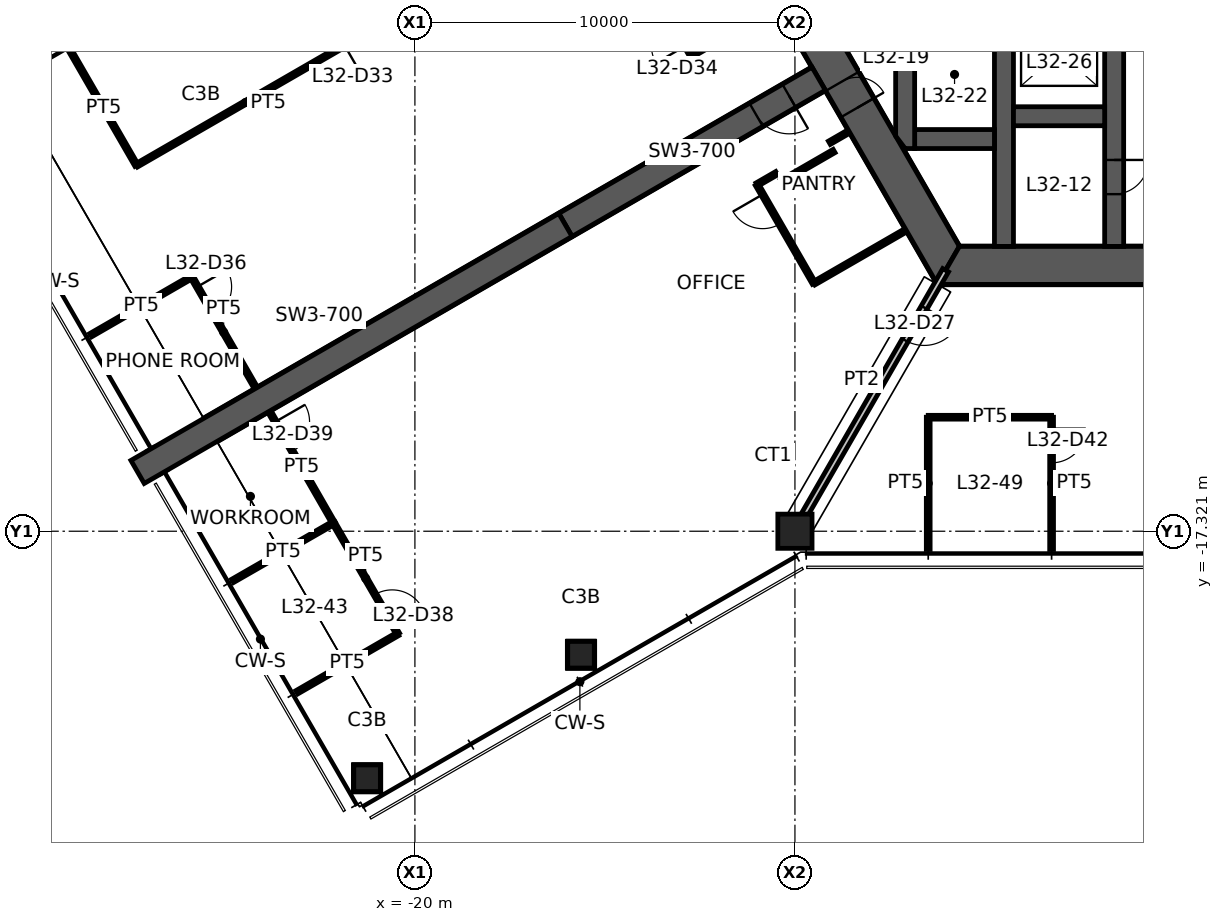
"""IFC4 building model, lengths in metres.
Left out: names, types, materials, properties, quantities, classifications, styles, units other than length and angle.
Written with IfcOpenShell. Run it as: python <this file> out.ifc"""

import sys

from ifc_helpers import new_model, si_unit, direction, frame, frame_2d, origin, origin_2d, place, context, subcontext, project, spatial, polyline, rectangle, hollow_rectangle, outline, extrude, element, fill, save


model = new_model("IFC4")
c1 = context("Model", 3, precision=1e-05, world=origin(), true_north=direction((0.0, 1.0)))
c2 = subcontext(c1, "Body", "Model", "MODEL_VIEW")
j1 = project(units=[si_unit("LENGTHUNIT", "METRE"), si_unit("PLANEANGLEUNIT", "RADIAN")], contexts=[c1])
p1 = place(None, origin())
s1 = spatial("IfcSite", under=j1, at=p1, CompositionType="ELEMENT")
p2 = place(p1, origin())
s2 = spatial("IfcBuilding", under=s1, at=p2, CompositionType="ELEMENT")
p3 = place(p2, frame((0.0, 0.0, 128.6)))
s3 = spatial("IfcBuildingStorey", under=s2, at=p3, CompositionType="ELEMENT", Elevation=128.6)
p4 = place(p3, frame((-10.0, -17.321, 0.0), z_axis=(0.0, 0.0, 1.0), x_axis=(1.0, 0.0, 0.0)))
e1 = element("IfcColumn", 1, at=p4, inside=s3, PredefinedType="COLUMN", context=c2, shape_type="SweptSolid", body=[
    extrude(hollow_rectangle(XDim=0.9, YDim=0.9, WallThickness=0.07, at=origin_2d()), origin(), (0.0, 0.0, 1.0), 4.5),
])
for number, where, z_axis, x_axis in (
    (2, (-15.629, -20.571, 0.0), (0.0, 0.0, 1.0), (1.0, 0.0, 0.0)),
    (3, (-21.258, -23.821, 0.0), (0.0, 0.0, 1.0), (1.0, 0.0, 0.0)),
):
    element("IfcColumn", number, at=place(p3, frame(where, z_axis=z_axis, x_axis=x_axis)), inside=s3, PredefinedType="COLUMN", context=c2, shape_type="SweptSolid", body=[
        extrude(hollow_rectangle(XDim=0.7, YDim=0.7, WallThickness=0.036, at=origin_2d()), origin(), (0.0, 0.0, 1.0), 4.5),
    ])
p5 = place(p3, frame((-11.922, 0.0, 0.0), z_axis=(0.0, 0.0, 1.0), x_axis=(0.500004296715, -0.866022923061, 0.0)))
e4 = element("IfcWall", 4, at=p5, inside=s3, PredefinedType="SHEAR", context=c2, shape_type="SweptSolid", body=[
    extrude(outline(polyline([(-0.289, -0.5), (6.331, -0.5), (7.131, -0.5), (12.211, -0.5), (11.634, 0.5), (7.131, 0.5), (6.331, 0.5), (0.289, 0.5), (-0.289, -0.5)])), origin(), (0.0, 0.0, 1.0), 4.5),
])
p6 = place(p5, frame((6.331, 0.0, 0.0)))
e5 = element("IfcOpeningElement", 5, at=p6, cuts=e4, PredefinedType="OPENING", context=c2, shape_type="SweptSolid", body=[
    extrude(rectangle(XDim=0.8, YDim=2.1, at=frame_2d((0.4, 1.05))), frame((0.0, 0.51, 0.0), z_axis=(0.0, -1.0, 0.0), x_axis=(1.0, 0.0, 0.0)), (0.0, 0.0, 1.0), 1.02),
])
p7 = place(p3, frame((-5.961, -10.325, 0.0), z_axis=(0.0, 0.0, 1.0), x_axis=(1.0, 0.0, 0.0)))
e6 = element("IfcWall", 6, at=p7, inside=s3, PredefinedType="SHEAR", context=c2, shape_type="SweptSolid", body=[
    extrude(outline(polyline([(-0.289, -0.5), (5.461, -0.5), (6.461, -0.5), (12.211, -0.5), (11.634, 0.5), (6.461, 0.5), (5.461, 0.5), (0.289, 0.5), (-0.289, -0.5)])), origin(), (0.0, 0.0, 1.0), 4.5),
])
p8 = place(p7, frame((5.461, 0.0, 0.0)))
e7 = element("IfcOpeningElement", 7, at=p8, cuts=e6, PredefinedType="OPENING", context=c2, shape_type="SweptSolid", body=[
    extrude(rectangle(XDim=1.0, YDim=2.1, at=frame_2d((0.5, 1.05))), frame((0.0, 0.51, 0.0), z_axis=(0.0, -1.0, 0.0), x_axis=(1.0, 0.0, 0.0)), (0.0, 0.0, 1.0), 1.02),
])
p9 = place(p3, frame((-9.375, -5.413, 0.0), z_axis=(0.0, 0.0, 1.0), x_axis=(-0.866032377459, -0.499987921047, 0.0)))
e8 = element("IfcWall", 8, at=p9, inside=s3, PredefinedType="SHEAR", context=c2, shape_type="SweptSolid", body=[
    extrude(rectangle(XDim=7.696, YDim=0.7, at=frame_2d((3.848, 0.0))), origin(), (0.0, 0.0, 1.0), 4.5),
])
p10 = place(p9, frame((0.9, 0.0, 0.0)))
e9 = element("IfcOpeningElement", 9, at=p10, cuts=e8, PredefinedType="OPENING", context=c2, shape_type="SweptSolid", body=[
    extrude(rectangle(XDim=1.0, YDim=2.1, at=frame_2d((0.5, 1.05))), frame((0.0, 0.36, 0.0), z_axis=(0.0, -1.0, 0.0), x_axis=(1.0, 0.0, 0.0)), (0.0, 0.0, 1.0), 0.72),
])
p11 = place(p3, frame((-16.039, -9.26, 0.0), z_axis=(0.0, 0.0, 1.0), x_axis=(-0.866024837091, -0.50000098154, 0.0)))
e10 = element("IfcWall", 10, at=p11, inside=s3, PredefinedType="SHEAR", context=c2, shape_type="SweptSolid", body=[
    extrude(rectangle(XDim=13.0, YDim=0.7, at=frame_2d((6.5, 0.0))), origin(), (0.0, 0.0, 1.0), 4.5),
])
p12 = place(p3, frame((-1.6, -3.85, 0.0), z_axis=(0.0, 0.0, 1.0), x_axis=(0.0, -1.0, 0.0)))
e11 = element("IfcWall", 11, at=p12, inside=s3, PredefinedType="SHEAR", context=c2, shape_type="SweptSolid", body=[
    extrude(rectangle(XDim=5.975, YDim=0.5, at=frame_2d((2.987, 0.0))), origin(), (0.0, 0.0, 1.0), 4.5),
])
p13 = place(p12, frame((3.7, 0.0, 0.0)))
e12 = element("IfcOpeningElement", 12, at=p13, cuts=e11, PredefinedType="OPENING", context=c2, shape_type="SweptSolid", body=[
    extrude(rectangle(XDim=0.9, YDim=2.1, at=frame_2d((0.45, 1.05))), frame((0.0, 0.26, 0.0), z_axis=(0.0, -1.0, 0.0), x_axis=(1.0, 0.0, 0.0)), (0.0, 0.0, 1.0), 0.52),
])
p14 = place(p3, frame((-4.5, -3.85, 0.0), z_axis=(0.0, 0.0, 1.0), x_axis=(0.0, -1.0, 0.0)))
e13 = element("IfcWall", 13, at=p14, inside=s3, PredefinedType="SHEAR", context=c2, shape_type="SweptSolid", body=[
    extrude(rectangle(XDim=5.975, YDim=0.5, at=frame_2d((2.987, 0.0))), origin(), (0.0, 0.0, 1.0), 4.5),
])
p15 = place(p3, frame((-4.25, -6.4, 0.0), z_axis=(0.0, 0.0, 1.0), x_axis=(1.0, 0.0, 0.0)))
e14 = element("IfcWall", 14, at=p15, inside=s3, PredefinedType="SHEAR", context=c2, shape_type="SweptSolid", body=[
    extrude(rectangle(XDim=2.4, YDim=0.5, at=frame_2d((1.2, 0.0))), origin(), (0.0, 0.0, 1.0), 4.5),
])
p16 = place(p3, frame((-6.85, -7.0, 0.0), z_axis=(0.0, 0.0, 1.0), x_axis=(1.0, 0.0, 0.0)))
e15 = element("IfcWall", 15, at=p16, inside=s3, PredefinedType="SHEAR", context=c2, shape_type="SweptSolid", body=[
    extrude(rectangle(XDim=2.1, YDim=0.5, at=frame_2d((1.05, 0.0))), origin(), (0.0, 0.0, 1.0), 4.5),
])
p17 = place(p3, frame((-7.1, -3.85, 0.0), z_axis=(0.0, 0.0, 1.0), x_axis=(0.0, -1.0, 0.0)))
e16 = element("IfcWall", 16, at=p17, inside=s3, PredefinedType="SHEAR", context=c2, shape_type="SweptSolid", body=[
    extrude(outline(polyline([(0.0, -0.25), (3.069, -0.25), (3.4, 0.0), (3.4, 0.25), (0.0, 0.25), (0.0, -0.25)])), origin(), (0.0, 0.0, 1.0), 4.5),
])
p18 = place(p3, frame((-6.035, -10.453, 0.0), z_axis=(0.0, 0.0, 1.0), x_axis=(-0.499989830942, -0.866031274813, 0.0)))
e17 = element("IfcWall", 17, at=p18, inside=s3, PredefinedType="PARTITIONING", context=c2, shape_type="SweptSolid", body=[
    extrude(rectangle(XDim=7.93, YDim=0.175, at=frame_2d((3.965, 0.0))), origin(), (0.0, 0.0, 1.0), 3.65),
])
p19 = place(p18, frame((1.13, 0.0, 0.0)))
e18 = element("IfcOpeningElement", 18, at=p19, cuts=e17, PredefinedType="OPENING", context=c2, shape_type="SweptSolid", body=[
    extrude(rectangle(XDim=1.0, YDim=2.1, at=frame_2d((0.5, 1.05))), frame((0.0, 0.098, 0.0), z_axis=(0.0, -1.0, 0.0), x_axis=(1.0, 0.0, 0.0)), (0.0, 0.0, 1.0), 0.195),
])
p20 = place(p3, frame((-27.325, -7.693, 0.0), z_axis=(0.0, 0.0, 1.0), x_axis=(-0.500020871164, 0.866013353477, 0.0)))
e19 = element("IfcWall", 19, at=p20, inside=s3, PredefinedType="PARTITIONING", context=c2, shape_type="SweptSolid", body=[
    extrude(rectangle(XDim=3.47, YDim=0.1, at=frame_2d((1.735, 0.0))), origin(), (0.0, 0.0, 1.0), 3.55),
])
p21 = place(p3, frame((-21.592, -4.383, 0.0), z_axis=(0.0, 0.0, 1.0), x_axis=(-0.866021597574, -0.500006592492, 0.0)))
e20 = element("IfcWall", 20, at=p21, inside=s3, PredefinedType="PARTITIONING", context=c2, shape_type="SweptSolid", body=[
    extrude(rectangle(XDim=6.62, YDim=0.1, at=frame_2d((3.31, 0.0))), origin(), (0.0, 0.0, 1.0), 3.55),
])
p22 = place(p21, frame((0.3, 0.0, 0.0)))
e21 = element("IfcOpeningElement", 21, at=p22, cuts=e20, PredefinedType="OPENING", context=c2, shape_type="SweptSolid", body=[
    extrude(rectangle(XDim=0.9, YDim=2.1, at=frame_2d((0.45, 1.05))), frame((0.0, 0.06, 0.0), z_axis=(0.0, -1.0, 0.0), x_axis=(1.0, 0.0, 0.0)), (0.0, 0.0, 1.0), 0.12),
])
p23 = place(p3, frame((-12.726, -4.807, 0.0), z_axis=(0.0, 0.0, 1.0), x_axis=(-0.500062241894, 0.865989465428, 0.0)))
e22 = element("IfcWall", 22, at=p23, inside=s3, PredefinedType="PARTITIONING", context=c2, shape_type="SweptSolid", body=[
    extrude(rectangle(XDim=3.4, YDim=0.1, at=frame_2d((1.7, 0.0))), origin(), (0.0, 0.0, 1.0), 3.55),
])
p24 = place(p23, frame((0.3, 0.0, 0.0)))
e23 = element("IfcOpeningElement", 23, at=p24, cuts=e22, PredefinedType="OPENING", context=c2, shape_type="SweptSolid", body=[
    extrude(rectangle(XDim=0.9, YDim=2.1, at=frame_2d((0.45, 1.05))), frame((0.0, 0.06, 0.0), z_axis=(0.0, -1.0, 0.0), x_axis=(1.0, 0.0, 0.0)), (0.0, 0.0, 1.0), 0.12),
])
p25 = place(p3, frame((-10.492, -3.517, 0.0), z_axis=(0.0, 0.0, 1.0), x_axis=(-0.866021702275, -0.500006411147, 0.0)))
e24 = element("IfcWall", 24, at=p25, inside=s3, PredefinedType="PARTITIONING", context=c2, shape_type="SweptSolid", body=[
    extrude(rectangle(XDim=2.58, YDim=0.1, at=frame_2d((1.29, 0.0))), origin(), (0.0, 0.0, 1.0), 3.55),
])
p26 = place(p3, frame((-28.532, -12.162, 0.0), z_axis=(0.0, 0.0, 1.0), x_axis=(0.866037264291, 0.499979456437, 0.0)))
e25 = element("IfcWall", 25, at=p26, inside=s3, PredefinedType="PARTITIONING", context=c2, shape_type="SweptSolid", body=[
    extrude(rectangle(XDim=3.07, YDim=0.1, at=frame_2d((1.535, 0.0))), origin(), (0.0, 0.0, 1.0), 3.55),
])
p27 = place(p3, frame((-25.873, -10.627, 0.0), z_axis=(0.0, 0.0, 1.0), x_axis=(0.5000115033, -0.866018762249, 0.0)))
e26 = element("IfcWall", 26, at=p27, inside=s3, PredefinedType="PARTITIONING", context=c2, shape_type="SweptSolid", body=[
    extrude(rectangle(XDim=3.363, YDim=0.1, at=frame_2d((1.682, 0.0))), origin(), (0.0, 0.0, 1.0), 3.55),
])
p28 = place(p27, frame((0.3, 0.0, 0.0)))
e27 = element("IfcOpeningElement", 27, at=p28, cuts=e26, PredefinedType="OPENING", context=c2, shape_type="SweptSolid", body=[
    extrude(rectangle(XDim=0.9, YDim=2.1, at=frame_2d((0.45, 1.05))), frame((0.0, 0.06, 0.0), z_axis=(0.0, -1.0, 0.0), x_axis=(1.0, 0.0, 0.0)), (0.0, 0.0, 1.0), 0.12),
])
p29 = place(p3, frame((-11.0, -8.198, 0.0), z_axis=(0.0, 0.0, 1.0), x_axis=(0.866131372301, 0.499816412211, 0.0)))
e28 = element("IfcWall", 28, at=p29, inside=s3, PredefinedType="PARTITIONING", context=c2, shape_type="SweptSolid", body=[
    extrude(rectangle(XDim=0.6, YDim=0.1, at=frame_2d((0.3, 0.0))), origin(), (0.0, 0.0, 1.0), 3.55),
])
p30 = place(p3, frame((-10.355, -8.115, 0.0), z_axis=(0.0, 0.0, 1.0), x_axis=(0.866094119867, 0.499880961361, 0.0)))
e29 = element("IfcWall", 29, at=p30, inside=s3, PredefinedType="PARTITIONING", context=c2, shape_type="SweptSolid", body=[
    extrude(rectangle(XDim=1.6, YDim=0.1, at=frame_2d((0.8, 0.0))), origin(), (0.0, 0.0, 1.0), 3.55),
])
p31 = place(p3, frame((-9.5, -10.796, 0.0), z_axis=(0.0, 0.0, 1.0), x_axis=(-0.499990139034, 0.866031096941, 0.0)))
e30 = element("IfcWall", 30, at=p31, inside=s3, PredefinedType="PARTITIONING", context=c2, shape_type="SweptSolid", body=[
    extrude(rectangle(XDim=3.0, YDim=0.1, at=frame_2d((1.5, 0.0))), origin(), (0.0, 0.0, 1.0), 3.55),
])
p32 = place(p31, frame((1.8, 0.0, 0.0)))
e31 = element("IfcOpeningElement", 31, at=p32, cuts=e30, PredefinedType="OPENING", context=c2, shape_type="SweptSolid", body=[
    extrude(rectangle(XDim=0.9, YDim=2.1, at=frame_2d((0.45, 1.05))), frame((0.0, 0.06, 0.0), z_axis=(0.0, -1.0, 0.0), x_axis=(1.0, 0.0, 0.0)), (0.0, 0.0, 1.0), 0.12),
])
p33 = place(p3, frame((-9.094, -7.098, 0.0), z_axis=(0.0, 0.0, 1.0), x_axis=(0.865954211699, 0.50012328804, 0.0)))
e32 = element("IfcWall", 32, at=p33, inside=s3, PredefinedType="PARTITIONING", context=c2, shape_type="SweptSolid", body=[
    extrude(rectangle(XDim=0.58, YDim=0.1, at=frame_2d((0.29, 0.0))), origin(), (0.0, 0.0, 1.0), 3.55),
])
p34 = place(p3, frame((-7.092, -9.406, 0.0), z_axis=(0.0, 0.0, 1.0), x_axis=(-0.86603494908, -0.499983466698, 0.0)))
e33 = element("IfcWall", 33, at=p34, inside=s3, PredefinedType="PARTITIONING", context=c2, shape_type="SweptSolid", body=[
    extrude(rectangle(XDim=2.78, YDim=0.1, at=frame_2d((1.39, 0.0))), origin(), (0.0, 0.0, 1.0), 3.55),
])
p35 = place(p3, frame((-24.799, -18.628, 0.0), z_axis=(0.0, 0.0, 1.0), x_axis=(0.866820377992, 0.498620529359, 0.0)))
e34 = element("IfcWall", 34, at=p35, inside=s3, PredefinedType="PARTITIONING", context=c2, shape_type="SweptSolid", body=[
    extrude(rectangle(XDim=3.07, YDim=0.1, at=frame_2d((1.535, 0.0))), origin(), (0.0, 0.0, 1.0), 3.55),
])
p36 = place(p3, frame((-22.144, -17.096, 0.0), z_axis=(0.0, 0.0, 1.0), x_axis=(0.501158580036, -0.865355463181, 0.0)))
e35 = element("IfcWall", 35, at=p36, inside=s3, PredefinedType="PARTITIONING", context=c2, shape_type="SweptSolid", body=[
    extrude(rectangle(XDim=3.383, YDim=0.1, at=frame_2d((1.692, 0.0))), origin(), (0.0, 0.0, 1.0), 3.55),
])
p37 = place(p36, frame((2.183, 0.0, 0.0)))
e36 = element("IfcOpeningElement", 36, at=p37, cuts=e35, PredefinedType="OPENING", context=c2, shape_type="SweptSolid", body=[
    extrude(rectangle(XDim=0.9, YDim=2.1, at=frame_2d((0.45, 1.05))), frame((0.0, 0.06, 0.0), z_axis=(0.0, -1.0, 0.0), x_axis=(1.0, 0.0, 0.0)), (0.0, 0.0, 1.0), 0.12),
])
p38 = place(p3, frame((-20.448, -20.023, 0.0), z_axis=(0.0, 0.0, 1.0), x_axis=(-0.866002828817, -0.500039098953, 0.0)))
e37 = element("IfcWall", 37, at=p38, inside=s3, PredefinedType="PARTITIONING", context=c2, shape_type="SweptSolid", body=[
    extrude(rectangle(XDim=3.07, YDim=0.1, at=frame_2d((1.535, 0.0))), origin(), (0.0, 0.0, 1.0), 3.55),
])
p39 = place(p3, frame((-23.822, -14.181, 0.0), z_axis=(0.0, 0.0, 1.0), x_axis=(0.498880193261, -0.866670959922, 0.0)))
e38 = element("IfcWall", 38, at=p39, inside=s3, PredefinedType="PARTITIONING", context=c2, shape_type="SweptSolid", body=[
    extrude(rectangle(XDim=3.364, YDim=0.1, at=frame_2d((1.682, 0.0))), origin(), (0.0, 0.0, 1.0), 3.55),
])
p40 = place(p39, frame((0.3, 0.0, 0.0)))
e39 = element("IfcOpeningElement", 39, at=p40, cuts=e38, PredefinedType="OPENING", context=c2, shape_type="SweptSolid", body=[
    extrude(rectangle(XDim=0.9, YDim=2.1, at=frame_2d((0.45, 1.05))), frame((0.0, 0.06, 0.0), z_axis=(0.0, -1.0, 0.0), x_axis=(1.0, 0.0, 0.0)), (0.0, 0.0, 1.0), 0.12),
])
p41 = place(p3, frame((-6.493, -17.801, 0.0), z_axis=(0.0, 0.0, 1.0), x_axis=(0.0, 1.0, 0.0)))
e40 = element("IfcWall", 40, at=p41, inside=s3, PredefinedType="PARTITIONING", context=c2, shape_type="SweptSolid", body=[
    extrude(rectangle(XDim=3.48, YDim=0.1, at=frame_2d((1.74, 0.0))), origin(), (0.0, 0.0, 1.0), 3.55),
])
p42 = place(p3, frame((-6.493, -14.321, 0.0), z_axis=(0.0, 0.0, 1.0), x_axis=(1.0, 0.0, 0.0)))
e41 = element("IfcWall", 41, at=p42, inside=s3, PredefinedType="PARTITIONING", context=c2, shape_type="SweptSolid", body=[
    extrude(rectangle(XDim=3.247, YDim=0.1, at=frame_2d((1.623, 0.0))), origin(), (0.0, 0.0, 1.0), 3.55),
])
p43 = place(p3, frame((-3.246, -14.321, 0.0), z_axis=(0.0, 0.0, 1.0), x_axis=(0.0, -1.0, 0.0)))
e42 = element("IfcWall", 42, at=p43, inside=s3, PredefinedType="PARTITIONING", context=c2, shape_type="SweptSolid", body=[
    extrude(rectangle(XDim=3.48, YDim=0.1, at=frame_2d((1.74, 0.0))), origin(), (0.0, 0.0, 1.0), 3.55),
])
p44 = place(p43, frame((0.3, 0.0, 0.0)))
e43 = element("IfcOpeningElement", 43, at=p44, cuts=e42, PredefinedType="OPENING", context=c2, shape_type="SweptSolid", body=[
    extrude(rectangle(XDim=0.9, YDim=2.1, at=frame_2d((0.45, 1.05))), frame((0.0, 0.06, 0.0), z_axis=(0.0, -1.0, 0.0), x_axis=(1.0, 0.0, 0.0)), (0.0, 0.0, 1.0), 0.12),
])
p45 = place(p6, origin())
e44 = element("IfcDoor", 44, at=p45, inside=s3, OperationType="SINGLE_SWING_RIGHT", PredefinedType="DOOR", context=c2, shape_type="SweptSolid", body=[
    extrude(rectangle(XDim=0.8, YDim=2.1, at=frame_2d((0.4, 1.05))), frame((0.0, 0.025, 0.0), z_axis=(0.0, -1.0, 0.0), x_axis=(1.0, 0.0, 0.0)), (0.0, 0.0, 1.0), 0.05),
])
fill(e5, e44)
p46 = place(p13, origin())
e45 = element("IfcDoor", 45, at=p46, inside=s3, OperationType="SINGLE_SWING_LEFT", PredefinedType="DOOR", context=c2, shape_type="SweptSolid", body=[
    extrude(rectangle(XDim=0.9, YDim=2.1, at=frame_2d((0.45, 1.05))), frame((0.0, 0.025, 0.0), z_axis=(0.0, -1.0, 0.0), x_axis=(1.0, 0.0, 0.0)), (0.0, 0.0, 1.0), 0.05),
])
fill(e12, e45)
p47 = place(p10, origin())
e46 = element("IfcDoor", 46, at=p47, inside=s3, OperationType="SINGLE_SWING_LEFT", PredefinedType="DOOR", context=c2, shape_type="SweptSolid", body=[
    extrude(rectangle(XDim=1.0, YDim=2.1, at=frame_2d((0.5, 1.05))), frame((0.0, 0.025, 0.0), z_axis=(0.0, -1.0, 0.0), x_axis=(1.0, 0.0, 0.0)), (0.0, 0.0, 1.0), 0.05),
])
fill(e9, e46)
p48 = place(p19, origin())
e47 = element("IfcDoor", 47, at=p48, inside=s3, OperationType="SINGLE_SWING_LEFT", PredefinedType="DOOR", context=c2, shape_type="SweptSolid", body=[
    extrude(rectangle(XDim=1.0, YDim=2.1, at=frame_2d((0.5, 1.05))), frame((0.0, 0.025, 0.0), z_axis=(0.0, -1.0, 0.0), x_axis=(1.0, 0.0, 0.0)), (0.0, 0.0, 1.0), 0.05),
])
fill(e18, e47)
p49 = place(p22, origin())
e48 = element("IfcDoor", 48, at=p49, inside=s3, OperationType="SINGLE_SWING_LEFT", PredefinedType="DOOR", context=c2, shape_type="SweptSolid", body=[
    extrude(rectangle(XDim=0.9, YDim=2.1, at=frame_2d((0.45, 1.05))), frame((0.0, 0.025, 0.0), z_axis=(0.0, -1.0, 0.0), x_axis=(1.0, 0.0, 0.0)), (0.0, 0.0, 1.0), 0.05),
])
fill(e21, e48)
p50 = place(p28, origin())
e49 = element("IfcDoor", 49, at=p50, inside=s3, OperationType="SINGLE_SWING_LEFT", PredefinedType="DOOR", context=c2, shape_type="SweptSolid", body=[
    extrude(rectangle(XDim=0.9, YDim=2.1, at=frame_2d((0.45, 1.05))), frame((0.0, 0.025, 0.0), z_axis=(0.0, -1.0, 0.0), x_axis=(1.0, 0.0, 0.0)), (0.0, 0.0, 1.0), 0.05),
])
fill(e27, e49)
p51 = place(p32, origin())
e50 = element("IfcDoor", 50, at=p51, inside=s3, OperationType="SINGLE_SWING_RIGHT", PredefinedType="DOOR", context=c2, shape_type="SweptSolid", body=[
    extrude(rectangle(XDim=0.9, YDim=2.1, at=frame_2d((0.45, 1.05))), frame((0.0, 0.025, 0.0), z_axis=(0.0, -1.0, 0.0), x_axis=(1.0, 0.0, 0.0)), (0.0, 0.0, 1.0), 0.05),
])
fill(e31, e50)
p52 = place(p37, origin())
e51 = element("IfcDoor", 51, at=p52, inside=s3, OperationType="SINGLE_SWING_RIGHT", PredefinedType="DOOR", context=c2, shape_type="SweptSolid", body=[
    extrude(rectangle(XDim=0.9, YDim=2.1, at=frame_2d((0.45, 1.05))), frame((0.0, 0.025, 0.0), z_axis=(0.0, -1.0, 0.0), x_axis=(1.0, 0.0, 0.0)), (0.0, 0.0, 1.0), 0.05),
])
fill(e36, e51)
p53 = place(p40, origin())
e52 = element("IfcDoor", 52, at=p53, inside=s3, OperationType="SINGLE_SWING_LEFT", PredefinedType="DOOR", context=c2, shape_type="SweptSolid", body=[
    extrude(rectangle(XDim=0.9, YDim=2.1, at=frame_2d((0.45, 1.05))), frame((0.0, 0.025, 0.0), z_axis=(0.0, -1.0, 0.0), x_axis=(1.0, 0.0, 0.0)), (0.0, 0.0, 1.0), 0.05),
])
fill(e39, e52)
p54 = place(p44, origin())
e53 = element("IfcDoor", 53, at=p54, inside=s3, OperationType="SINGLE_SWING_LEFT", PredefinedType="DOOR", context=c2, shape_type="SweptSolid", body=[
    extrude(rectangle(XDim=0.9, YDim=2.1, at=frame_2d((0.45, 1.05))), frame((0.0, 0.025, 0.0), z_axis=(0.0, -1.0, 0.0), x_axis=(1.0, 0.0, 0.0)), (0.0, 0.0, 1.0), 0.05),
])
fill(e43, e53)
save(model, sys.argv[1])
